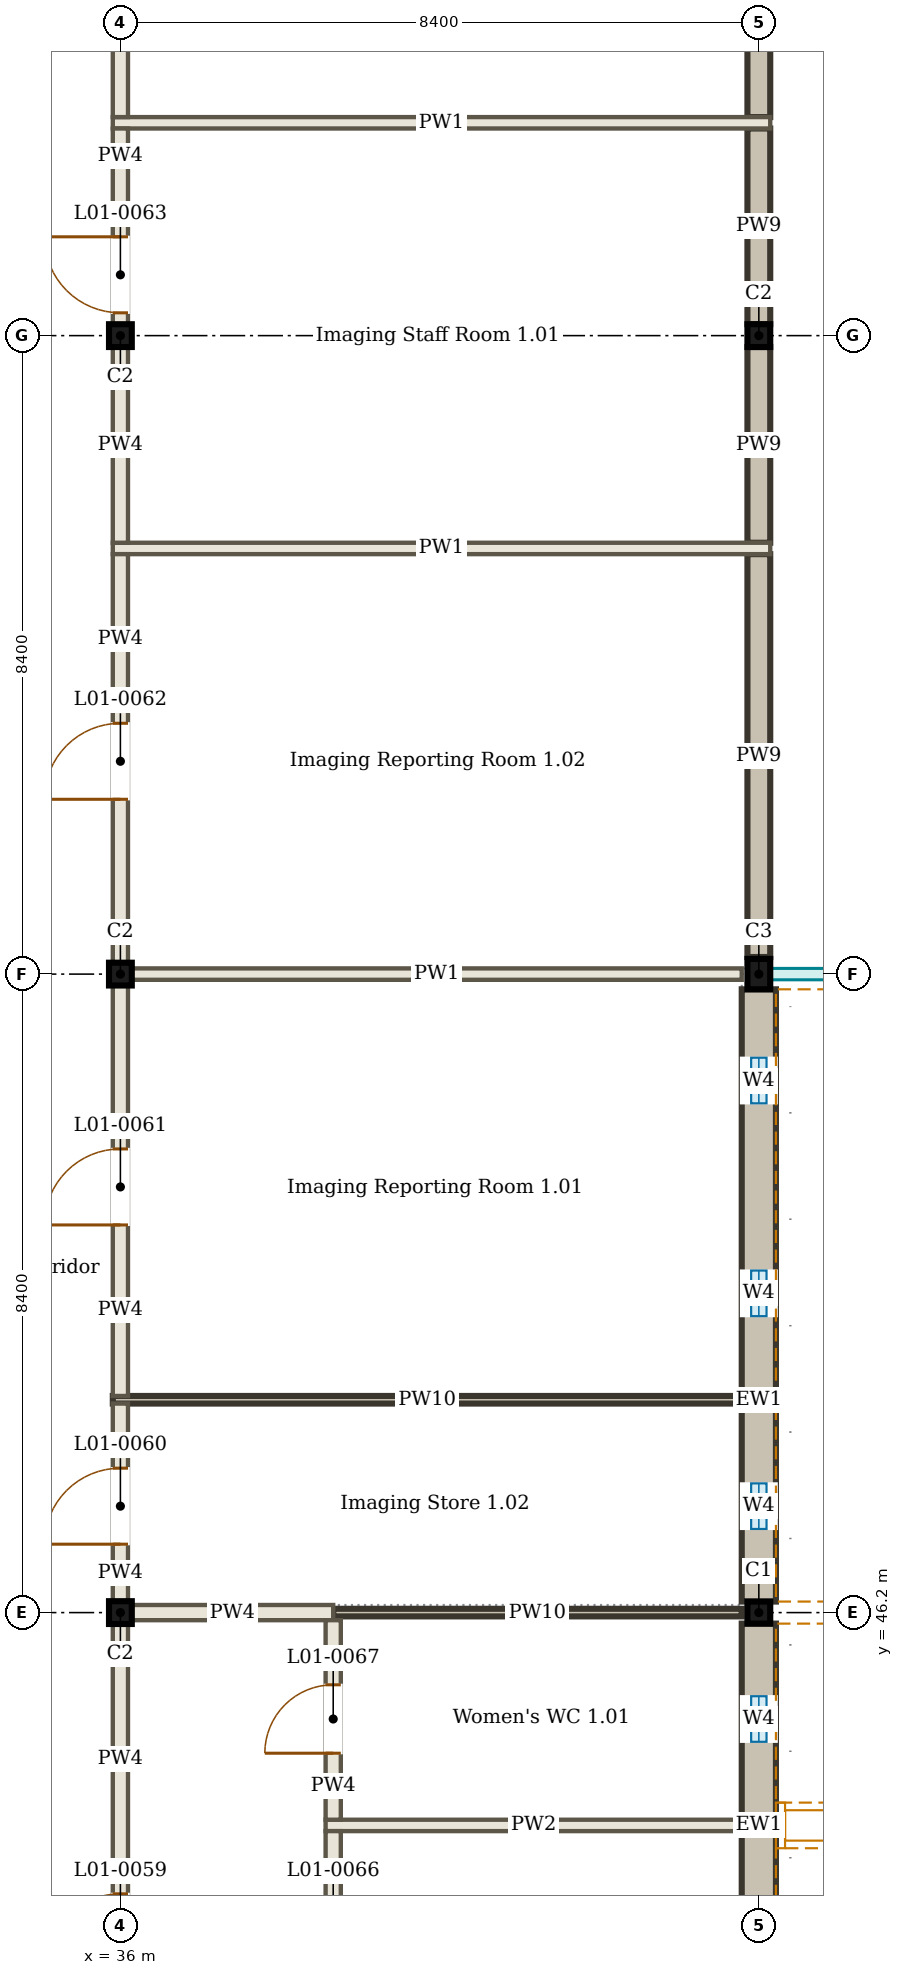
"""IFC4 building model, lengths in metres.
Left out: names, types, materials, properties, quantities, classifications, styles, units other than length and angle.
Written with IfcOpenShell. Run it as: python <this file> out.ifc"""

import sys

from ifc_helpers import new_model, si_unit, direction, frame, frame_2d, origin, origin_2d, place, context, subcontext, project, spatial, rectangle, i_section, extrude, element, fill, save


model = new_model("IFC4")
c1 = context("Model", 3, precision=1e-05, world=origin(), true_north=direction((0.0, 1.0)))
c2 = subcontext(c1, "Body", "Model", "MODEL_VIEW")
j1 = project(units=[si_unit("LENGTHUNIT", "METRE"), si_unit("PLANEANGLEUNIT", "RADIAN")], contexts=[c1])
p1 = place(None, origin())
s1 = spatial("IfcSite", under=j1, at=p1, CompositionType="ELEMENT")
p2 = place(p1, origin())
s2 = spatial("IfcBuilding", under=s1, at=p2, CompositionType="ELEMENT")
p3 = place(p2, frame((0.0, 0.0, 4.5)))
s3 = spatial("IfcBuildingStorey", under=s2, at=p3, CompositionType="ELEMENT", Elevation=4.5)
p4 = place(p3, frame((36.0, 46.2, 0.0), z_axis=(0.0, 0.0, 1.0), x_axis=(1.0, 0.0, 0.0)))
e1 = element("IfcColumn", 1, at=p4, inside=s3, PredefinedType="COLUMN", context=c2, shape_type="SweptSolid", body=[
    extrude(i_section(OverallWidth=0.3, OverallDepth=0.3, WebThickness=0.011, FlangeThickness=0.019, FilletRadius=0.027, at=origin_2d()), origin(), (0.0, 0.0, 1.0), 4.5),
])
p5 = place(p3, frame((44.4, 46.2, 0.0), z_axis=(0.0, 0.0, 1.0), x_axis=(1.0, 0.0, 0.0)))
e2 = element("IfcColumn", 2, at=p5, inside=s3, PredefinedType="COLUMN", context=c2, shape_type="SweptSolid", body=[
    extrude(i_section(OverallWidth=0.3, OverallDepth=0.29, WebThickness=0.009, FlangeThickness=0.014, FilletRadius=0.027, at=origin_2d()), origin(), (0.0, 0.0, 1.0), 4.5),
])
p6 = place(p3, frame((36.0, 54.6, 0.0), z_axis=(0.0, 0.0, 1.0), x_axis=(1.0, 0.0, 0.0)))
e3 = element("IfcColumn", 3, at=p6, inside=s3, PredefinedType="COLUMN", context=c2, shape_type="SweptSolid", body=[
    extrude(i_section(OverallWidth=0.3, OverallDepth=0.3, WebThickness=0.011, FlangeThickness=0.019, FilletRadius=0.027, at=origin_2d()), origin(), (0.0, 0.0, 1.0), 4.5),
])
p7 = place(p3, frame((44.4, 54.6, 0.0), z_axis=(0.0, 0.0, 1.0), x_axis=(1.0, 0.0, 0.0)))
e4 = element("IfcColumn", 4, at=p7, inside=s3, PredefinedType="COLUMN", context=c2, shape_type="SweptSolid", body=[
    extrude(i_section(OverallWidth=0.3, OverallDepth=0.4, WebThickness=0.013, FlangeThickness=0.024, FilletRadius=0.027, at=origin_2d()), origin(), (0.0, 0.0, 1.0), 4.5),
])
for number, where, z_axis, x_axis in (
    (5, (36.0, 63.0, 0.0), (0.0, 0.0, 1.0), (1.0, 0.0, 0.0)),
    (6, (44.4, 63.0, 0.0), (0.0, 0.0, 1.0), (1.0, 0.0, 0.0)),
):
    element("IfcColumn", number, at=place(p3, frame(where, z_axis=z_axis, x_axis=x_axis)), inside=s3, PredefinedType="COLUMN", context=c2, shape_type="SweptSolid", body=[
        extrude(i_section(OverallWidth=0.3, OverallDepth=0.3, WebThickness=0.011, FlangeThickness=0.019, FilletRadius=0.027, at=origin_2d()), origin(), (0.0, 0.0, 1.0), 4.5),
    ])
p8 = place(p3, frame((44.4, 37.8, 0.0), z_axis=(0.0, 0.0, 1.0), x_axis=(0.0, 1.0, 0.0)))
e7 = element("IfcWall", 7, at=p8, inside=s3, PredefinedType="SOLIDWALL", context=c2, shape_type="SweptSolid", body=[
    extrude(rectangle(XDim=8.255, YDim=0.45, at=frame_2d((4.127, 0.0))), origin(), (0.0, 0.0, 1.0), 4.05),
])
p9 = place(p8, frame((1.1, 0.0, 2.1)))
e8 = element("IfcOpeningElement", 8, at=p9, cuts=e7, PredefinedType="OPENING", context=c2, shape_type="SweptSolid", body=[
    extrude(rectangle(XDim=0.6, YDim=1.2, at=frame_2d((0.3, 0.6))), frame((0.0, 0.235, 0.0), z_axis=(0.0, -1.0, 0.0), x_axis=(1.0, 0.0, 0.0)), (0.0, 0.0, 1.0), 0.47),
])
p10 = place(p8, frame((3.9, 0.0, 2.1)))
e9 = element("IfcOpeningElement", 9, at=p10, cuts=e7, PredefinedType="OPENING", context=c2, shape_type="SweptSolid", body=[
    extrude(rectangle(XDim=0.6, YDim=1.2, at=frame_2d((0.3, 0.6))), frame((0.0, 0.235, 0.0), z_axis=(0.0, -1.0, 0.0), x_axis=(1.0, 0.0, 0.0)), (0.0, 0.0, 1.0), 0.47),
])
p11 = place(p8, frame((6.7, 0.0, 2.1)))
e10 = element("IfcOpeningElement", 10, at=p11, cuts=e7, PredefinedType="OPENING", context=c2, shape_type="SweptSolid", body=[
    extrude(rectangle(XDim=0.6, YDim=1.2, at=frame_2d((0.3, 0.6))), frame((0.0, 0.235, 0.0), z_axis=(0.0, -1.0, 0.0), x_axis=(1.0, 0.0, 0.0)), (0.0, 0.0, 1.0), 0.47),
])
p12 = place(p3, frame((44.4, 46.345, 0.0), z_axis=(0.0, 0.0, 1.0), x_axis=(0.0, 1.0, 0.0)))
e11 = element("IfcWall", 11, at=p12, inside=s3, PredefinedType="SOLIDWALL", context=c2, shape_type="SweptSolid", body=[
    extrude(rectangle(XDim=8.055, YDim=0.45, at=frame_2d((4.027, 0.0))), origin(), (0.0, 0.0, 1.0), 4.05),
])
p13 = place(p12, frame((0.955, 0.0, 2.1)))
e12 = element("IfcOpeningElement", 12, at=p13, cuts=e11, PredefinedType="OPENING", context=c2, shape_type="SweptSolid", body=[
    extrude(rectangle(XDim=0.6, YDim=1.2, at=frame_2d((0.3, 0.6))), frame((0.0, 0.235, 0.0), z_axis=(0.0, -1.0, 0.0), x_axis=(1.0, 0.0, 0.0)), (0.0, 0.0, 1.0), 0.47),
])
p14 = place(p12, frame((3.755, 0.0, 2.1)))
e13 = element("IfcOpeningElement", 13, at=p14, cuts=e11, PredefinedType="OPENING", context=c2, shape_type="SweptSolid", body=[
    extrude(rectangle(XDim=0.6, YDim=1.2, at=frame_2d((0.3, 0.6))), frame((0.0, 0.235, 0.0), z_axis=(0.0, -1.0, 0.0), x_axis=(1.0, 0.0, 0.0)), (0.0, 0.0, 1.0), 0.47),
])
p15 = place(p12, frame((6.555, 0.0, 2.1)))
e14 = element("IfcOpeningElement", 14, at=p15, cuts=e11, PredefinedType="OPENING", context=c2, shape_type="SweptSolid", body=[
    extrude(rectangle(XDim=0.6, YDim=1.2, at=frame_2d((0.3, 0.6))), frame((0.0, 0.235, 0.0), z_axis=(0.0, -1.0, 0.0), x_axis=(1.0, 0.0, 0.0)), (0.0, 0.0, 1.0), 0.47),
])
p16 = place(p3, frame((38.7, 43.4, 0.0), z_axis=(0.0, 0.0, 1.0), x_axis=(1.0, 0.0, 0.0)))
e15 = element("IfcWall", 15, at=p16, inside=s3, PredefinedType="PARTITIONING", context=c2, shape_type="SweptSolid", body=[
    extrude(rectangle(XDim=5.475, YDim=0.15, at=frame_2d((2.738, 0.0))), origin(), (0.0, 0.0, 1.0), 4.35),
])
p17 = place(p3, frame((36.15, 46.2, 0.0), z_axis=(0.0, 0.0, 1.0), x_axis=(1.0, 0.0, 0.0)))
e16 = element("IfcWall", 16, at=p17, inside=s3, PredefinedType="PARTITIONING", context=c2, shape_type="SweptSolid", body=[
    extrude(rectangle(XDim=2.65, YDim=0.2, at=frame_2d((1.325, 0.0))), origin(), (0.0, 0.0, 1.0), 4.044),
])
p18 = place(p3, frame((38.8, 46.2, 0.0), z_axis=(0.0, 0.0, 1.0), x_axis=(1.0, 0.0, 0.0)))
e17 = element("IfcWall", 17, at=p18, inside=s3, PredefinedType="SOLIDWALL", context=c2, shape_type="SweptSolid", body=[
    extrude(rectangle(XDim=5.375, YDim=0.1, at=frame_2d((2.688, 0.0))), origin(), (0.0, 0.0, 1.0), 4.044),
])
p19 = place(p3, frame((35.9, 49.0, 0.0), z_axis=(0.0, 0.0, 1.0), x_axis=(1.0, 0.0, 0.0)))
e18 = element("IfcWall", 18, at=p19, inside=s3, PredefinedType="SOLIDWALL", context=c2, shape_type="SweptSolid", body=[
    extrude(rectangle(XDim=8.275, YDim=0.1, at=frame_2d((4.138, 0.0))), origin(), (0.0, 0.0, 1.0), 4.1),
])
p20 = place(p3, frame((36.15, 54.6, 0.0), z_axis=(0.0, 0.0, 1.0), x_axis=(1.0, 0.0, 0.0)))
e19 = element("IfcWall", 19, at=p20, inside=s3, PredefinedType="PARTITIONING", context=c2, shape_type="SweptSolid", body=[
    extrude(rectangle(XDim=8.025, YDim=0.15, at=frame_2d((4.013, 0.0))), origin(), (0.0, 0.0, 1.0), 4.044),
])
for number, where, z_axis, x_axis in (
    (20, (35.9, 60.2, 0.0), (0.0, 0.0, 1.0), (1.0, 0.0, 0.0)),
    (21, (35.9, 65.8, 0.0), (0.0, 0.0, 1.0), (1.0, 0.0, 0.0)),
):
    element("IfcWall", number, at=place(p3, frame(where, z_axis=z_axis, x_axis=x_axis)), inside=s3, PredefinedType="PARTITIONING", context=c2, shape_type="SweptSolid", body=[
        extrude(rectangle(XDim=8.65, YDim=0.15, at=frame_2d((4.325, 0.0))), origin(), (0.0, 0.0, 1.0), 4.1),
    ])
p21 = place(p3, frame((36.0, 37.8, 0.0), z_axis=(0.0, 0.0, 1.0), x_axis=(0.0, 1.0, 0.0)))
e22 = element("IfcWall", 22, at=p21, inside=s3, PredefinedType="PARTITIONING", context=c2, shape_type="SweptSolid", body=[
    extrude(rectangle(XDim=8.25, YDim=0.2, at=frame_2d((4.125, 0.0))), origin(), (0.0, 0.0, 1.0), 4.044),
])
p22 = place(p21, frame((3.7, 0.0, 0.0)))
e23 = element("IfcOpeningElement", 23, at=p22, cuts=e22, PredefinedType="OPENING", context=c2, shape_type="SweptSolid", body=[
    extrude(rectangle(XDim=1.0, YDim=2.1, at=frame_2d((0.5, 1.05))), frame((0.0, 0.11, 0.0), z_axis=(0.0, -1.0, 0.0), x_axis=(1.0, 0.0, 0.0)), (0.0, 0.0, 1.0), 0.22),
])
p23 = place(p3, frame((36.0, 46.35, 0.0), z_axis=(0.0, 0.0, 1.0), x_axis=(0.0, 1.0, 0.0)))
e24 = element("IfcWall", 24, at=p23, inside=s3, PredefinedType="PARTITIONING", context=c2, shape_type="SweptSolid", body=[
    extrude(rectangle(XDim=2.6, YDim=0.2, at=frame_2d((1.3, 0.0))), origin(), (0.0, 0.0, 1.0), 4.1),
])
p24 = place(p23, frame((0.75, 0.0, 0.0)))
e25 = element("IfcOpeningElement", 25, at=p24, cuts=e24, PredefinedType="OPENING", context=c2, shape_type="SweptSolid", body=[
    extrude(rectangle(XDim=1.0, YDim=2.1, at=frame_2d((0.5, 1.05))), frame((0.0, 0.11, 0.0), z_axis=(0.0, -1.0, 0.0), x_axis=(1.0, 0.0, 0.0)), (0.0, 0.0, 1.0), 0.22),
])
p25 = place(p3, frame((36.0, 49.05, 0.0), z_axis=(0.0, 0.0, 1.0), x_axis=(0.0, 1.0, 0.0)))
e26 = element("IfcWall", 26, at=p25, inside=s3, PredefinedType="PARTITIONING", context=c2, shape_type="SweptSolid", body=[
    extrude(rectangle(XDim=5.4, YDim=0.2, at=frame_2d((2.7, 0.0))), origin(), (0.0, 0.0, 1.0), 4.1),
])
p26 = place(p25, frame((2.25, 0.0, 0.0)))
e27 = element("IfcOpeningElement", 27, at=p26, cuts=e26, PredefinedType="OPENING", context=c2, shape_type="SweptSolid", body=[
    extrude(rectangle(XDim=1.0, YDim=2.1, at=frame_2d((0.5, 1.05))), frame((0.0, 0.11, 0.0), z_axis=(0.0, -1.0, 0.0), x_axis=(1.0, 0.0, 0.0)), (0.0, 0.0, 1.0), 0.22),
])
p27 = place(p3, frame((36.0, 54.75, 0.0), z_axis=(0.0, 0.0, 1.0), x_axis=(0.0, 1.0, 0.0)))
e28 = element("IfcWall", 28, at=p27, inside=s3, PredefinedType="PARTITIONING", context=c2, shape_type="SweptSolid", body=[
    extrude(rectangle(XDim=5.375, YDim=0.2, at=frame_2d((2.688, 0.0))), origin(), (0.0, 0.0, 1.0), 4.1),
])
p28 = place(p27, frame((2.15, 0.0, 0.0)))
e29 = element("IfcOpeningElement", 29, at=p28, cuts=e28, PredefinedType="OPENING", context=c2, shape_type="SweptSolid", body=[
    extrude(rectangle(XDim=1.0, YDim=2.1, at=frame_2d((0.5, 1.05))), frame((0.0, 0.11, 0.0), z_axis=(0.0, -1.0, 0.0), x_axis=(1.0, 0.0, 0.0)), (0.0, 0.0, 1.0), 0.22),
])
p29 = place(p3, frame((36.0, 60.275, 0.0), z_axis=(0.0, 0.0, 1.0), x_axis=(0.0, 1.0, 0.0)))
e30 = element("IfcWall", 30, at=p29, inside=s3, PredefinedType="PARTITIONING", context=c2, shape_type="SweptSolid", body=[
    extrude(rectangle(XDim=2.575, YDim=0.2, at=frame_2d((1.288, 0.0))), origin(), (0.0, 0.0, 1.0), 4.1),
])
p30 = place(p3, frame((36.0, 63.15, 0.0), z_axis=(0.0, 0.0, 1.0), x_axis=(0.0, 1.0, 0.0)))
e31 = element("IfcWall", 31, at=p30, inside=s3, PredefinedType="PARTITIONING", context=c2, shape_type="SweptSolid", body=[
    extrude(rectangle(XDim=2.575, YDim=0.2, at=frame_2d((1.288, 0.0))), origin(), (0.0, 0.0, 1.0), 4.1),
])
p31 = place(p30, frame((0.15, 0.0, 0.0)))
e32 = element("IfcOpeningElement", 32, at=p31, cuts=e31, PredefinedType="OPENING", context=c2, shape_type="SweptSolid", body=[
    extrude(rectangle(XDim=1.0, YDim=2.1, at=frame_2d((0.5, 1.05))), frame((0.0, 0.11, 0.0), z_axis=(0.0, -1.0, 0.0), x_axis=(1.0, 0.0, 0.0)), (0.0, 0.0, 1.0), 0.22),
])
p32 = place(p3, frame((36.0, 65.875, 0.0), z_axis=(0.0, 0.0, 1.0), x_axis=(0.0, 1.0, 0.0)))
e33 = element("IfcWall", 33, at=p32, inside=s3, PredefinedType="PARTITIONING", context=c2, shape_type="SweptSolid", body=[
    extrude(rectangle(XDim=5.33, YDim=0.2, at=frame_2d((2.665, 0.0))), origin(), (0.0, 0.0, 1.0), 4.1),
])
p33 = place(p32, frame((2.225, 0.0, 0.0)))
e34 = element("IfcOpeningElement", 34, at=p33, cuts=e33, PredefinedType="OPENING", context=c2, shape_type="SweptSolid", body=[
    extrude(rectangle(XDim=1.0, YDim=2.1, at=frame_2d((0.5, 1.05))), frame((0.0, 0.11, 0.0), z_axis=(0.0, -1.0, 0.0), x_axis=(1.0, 0.0, 0.0)), (0.0, 0.0, 1.0), 0.22),
])
p34 = place(p3, frame((38.8, 40.675, 0.0), z_axis=(0.0, 0.0, 1.0), x_axis=(0.0, 1.0, 0.0)))
e35 = element("IfcWall", 35, at=p34, inside=s3, PredefinedType="PARTITIONING", context=c2, shape_type="SweptSolid", body=[
    extrude(rectangle(XDim=2.65, YDim=0.2, at=frame_2d((1.325, 0.0))), origin(), (0.0, 0.0, 1.0), 4.35),
])
p35 = place(p34, frame((0.875, 0.0, 0.0)))
e36 = element("IfcOpeningElement", 36, at=p35, cuts=e35, PredefinedType="OPENING", context=c2, shape_type="SweptSolid", body=[
    extrude(rectangle(XDim=0.9, YDim=2.1, at=frame_2d((0.45, 1.05))), frame((0.0, 0.11, 0.0), z_axis=(0.0, -1.0, 0.0), x_axis=(1.0, 0.0, 0.0)), (0.0, 0.0, 1.0), 0.22),
])
p36 = place(p3, frame((38.8, 43.475, 0.0), z_axis=(0.0, 0.0, 1.0), x_axis=(0.0, 1.0, 0.0)))
e37 = element("IfcWall", 37, at=p36, inside=s3, PredefinedType="PARTITIONING", context=c2, shape_type="SweptSolid", body=[
    extrude(rectangle(XDim=2.625, YDim=0.2, at=frame_2d((1.312, 0.0))), origin(), (0.0, 0.0, 1.0), 4.35),
])
p37 = place(p36, frame((0.875, 0.0, 0.0)))
e38 = element("IfcOpeningElement", 38, at=p37, cuts=e37, PredefinedType="OPENING", context=c2, shape_type="SweptSolid", body=[
    extrude(rectangle(XDim=0.9, YDim=2.1, at=frame_2d((0.45, 1.05))), frame((0.0, 0.11, 0.0), z_axis=(0.0, -1.0, 0.0), x_axis=(1.0, 0.0, 0.0)), (0.0, 0.0, 1.0), 0.22),
])
p38 = place(p3, frame((44.4, 54.825, 0.0), z_axis=(0.0, 0.0, 1.0), x_axis=(0.0, 1.0, 0.0)))
e39 = element("IfcWall", 39, at=p38, inside=s3, PredefinedType="SOLIDWALL", context=c2, shape_type="SweptSolid", body=[
    extrude(rectangle(XDim=5.3, YDim=0.3, at=frame_2d((2.65, 0.0))), origin(), (0.0, 0.0, 1.0), 4.1),
])
for number, where, z_axis, x_axis in (
    (40, (44.4, 60.275, 0.0), (0.0, 0.0, 1.0), (0.0, 1.0, 0.0)),
    (41, (44.4, 63.15, 0.0), (0.0, 0.0, 1.0), (0.0, 1.0, 0.0)),
):
    element("IfcWall", number, at=place(p3, frame(where, z_axis=z_axis, x_axis=x_axis)), inside=s3, PredefinedType="SOLIDWALL", context=c2, shape_type="SweptSolid", body=[
        extrude(rectangle(XDim=2.575, YDim=0.3, at=frame_2d((1.288, 0.0))), origin(), (0.0, 0.0, 1.0), 4.1),
    ])
p39 = place(p3, frame((44.4, 65.875, 0.0), z_axis=(0.0, 0.0, 1.0), x_axis=(0.0, 1.0, 0.0)))
e42 = element("IfcWall", 42, at=p39, inside=s3, PredefinedType="SOLIDWALL", context=c2, shape_type="SweptSolid", body=[
    extrude(rectangle(XDim=5.33, YDim=0.3, at=frame_2d((2.665, 0.0))), origin(), (0.0, 0.0, 1.0), 4.1),
])
p40 = place(p11, origin())
e43 = element("IfcWindow", 43, at=p40, inside=s3, PartitioningType="SINGLE_PANEL", PredefinedType="WINDOW", context=c2, shape_type="SweptSolid", body=[
    extrude(rectangle(XDim=0.6, YDim=1.2, at=frame_2d((0.3, 0.6))), frame((0.0, 0.135, 0.0), z_axis=(0.0, -1.0, 0.0), x_axis=(1.0, 0.0, 0.0)), (0.0, 0.0, 1.0), 0.06),
])
fill(e10, e43)
p41 = place(p13, origin())
e44 = element("IfcWindow", 44, at=p41, inside=s3, PartitioningType="SINGLE_PANEL", PredefinedType="WINDOW", context=c2, shape_type="SweptSolid", body=[
    extrude(rectangle(XDim=0.6, YDim=1.2, at=frame_2d((0.3, 0.6))), frame((0.0, 0.135, 0.0), z_axis=(0.0, -1.0, 0.0), x_axis=(1.0, 0.0, 0.0)), (0.0, 0.0, 1.0), 0.06),
])
fill(e12, e44)
p42 = place(p14, origin())
e45 = element("IfcWindow", 45, at=p42, inside=s3, PartitioningType="SINGLE_PANEL", PredefinedType="WINDOW", context=c2, shape_type="SweptSolid", body=[
    extrude(rectangle(XDim=0.6, YDim=1.2, at=frame_2d((0.3, 0.6))), frame((0.0, 0.135, 0.0), z_axis=(0.0, -1.0, 0.0), x_axis=(1.0, 0.0, 0.0)), (0.0, 0.0, 1.0), 0.06),
])
fill(e13, e45)
p43 = place(p15, origin())
e46 = element("IfcWindow", 46, at=p43, inside=s3, PartitioningType="SINGLE_PANEL", PredefinedType="WINDOW", context=c2, shape_type="SweptSolid", body=[
    extrude(rectangle(XDim=0.6, YDim=1.2, at=frame_2d((0.3, 0.6))), frame((0.0, 0.135, 0.0), z_axis=(0.0, -1.0, 0.0), x_axis=(1.0, 0.0, 0.0)), (0.0, 0.0, 1.0), 0.06),
])
fill(e14, e46)
p44 = place(p22, origin())
e47 = element("IfcDoor", 47, at=p44, inside=s3, OperationType="SINGLE_SWING_LEFT", PredefinedType="DOOR", context=c2, shape_type="SweptSolid", body=[
    extrude(rectangle(XDim=1.0, YDim=2.1, at=frame_2d((0.5, 1.05))), frame((0.0, 0.025, 0.0), z_axis=(0.0, -1.0, 0.0), x_axis=(1.0, 0.0, 0.0)), (0.0, 0.0, 1.0), 0.05),
])
fill(e23, e47)
p45 = place(p24, origin())
e48 = element("IfcDoor", 48, at=p45, inside=s3, OperationType="SINGLE_SWING_LEFT", PredefinedType="DOOR", context=c2, shape_type="SweptSolid", body=[
    extrude(rectangle(XDim=1.0, YDim=2.1, at=frame_2d((0.5, 1.05))), frame((0.0, 0.025, 0.0), z_axis=(0.0, -1.0, 0.0), x_axis=(1.0, 0.0, 0.0)), (0.0, 0.0, 1.0), 0.05),
])
fill(e25, e48)
p46 = place(p26, origin())
e49 = element("IfcDoor", 49, at=p46, inside=s3, OperationType="SINGLE_SWING_LEFT", PredefinedType="DOOR", context=c2, shape_type="SweptSolid", body=[
    extrude(rectangle(XDim=1.0, YDim=2.1, at=frame_2d((0.5, 1.05))), frame((0.0, 0.025, 0.0), z_axis=(0.0, -1.0, 0.0), x_axis=(1.0, 0.0, 0.0)), (0.0, 0.0, 1.0), 0.05),
])
fill(e27, e49)
p47 = place(p28, origin())
e50 = element("IfcDoor", 50, at=p47, inside=s3, OperationType="SINGLE_SWING_LEFT", PredefinedType="DOOR", context=c2, shape_type="SweptSolid", body=[
    extrude(rectangle(XDim=1.0, YDim=2.1, at=frame_2d((0.5, 1.05))), frame((0.0, 0.025, 0.0), z_axis=(0.0, -1.0, 0.0), x_axis=(1.0, 0.0, 0.0)), (0.0, 0.0, 1.0), 0.05),
])
fill(e29, e50)
p48 = place(p31, origin())
e51 = element("IfcDoor", 51, at=p48, inside=s3, OperationType="SINGLE_SWING_RIGHT", PredefinedType="DOOR", context=c2, shape_type="SweptSolid", body=[
    extrude(rectangle(XDim=1.0, YDim=2.1, at=frame_2d((0.5, 1.05))), frame((0.0, 0.025, 0.0), z_axis=(0.0, -1.0, 0.0), x_axis=(1.0, 0.0, 0.0)), (0.0, 0.0, 1.0), 0.05),
])
fill(e32, e51)
p49 = place(p37, origin())
e52 = element("IfcDoor", 52, at=p49, inside=s3, OperationType="SINGLE_SWING_LEFT", PredefinedType="DOOR", context=c2, shape_type="SweptSolid", body=[
    extrude(rectangle(XDim=0.9, YDim=2.1, at=frame_2d((0.45, 1.05))), frame((0.0, 0.025, 0.0), z_axis=(0.0, -1.0, 0.0), x_axis=(1.0, 0.0, 0.0)), (0.0, 0.0, 1.0), 0.05),
])
fill(e38, e52)
save(model, sys.argv[1])
